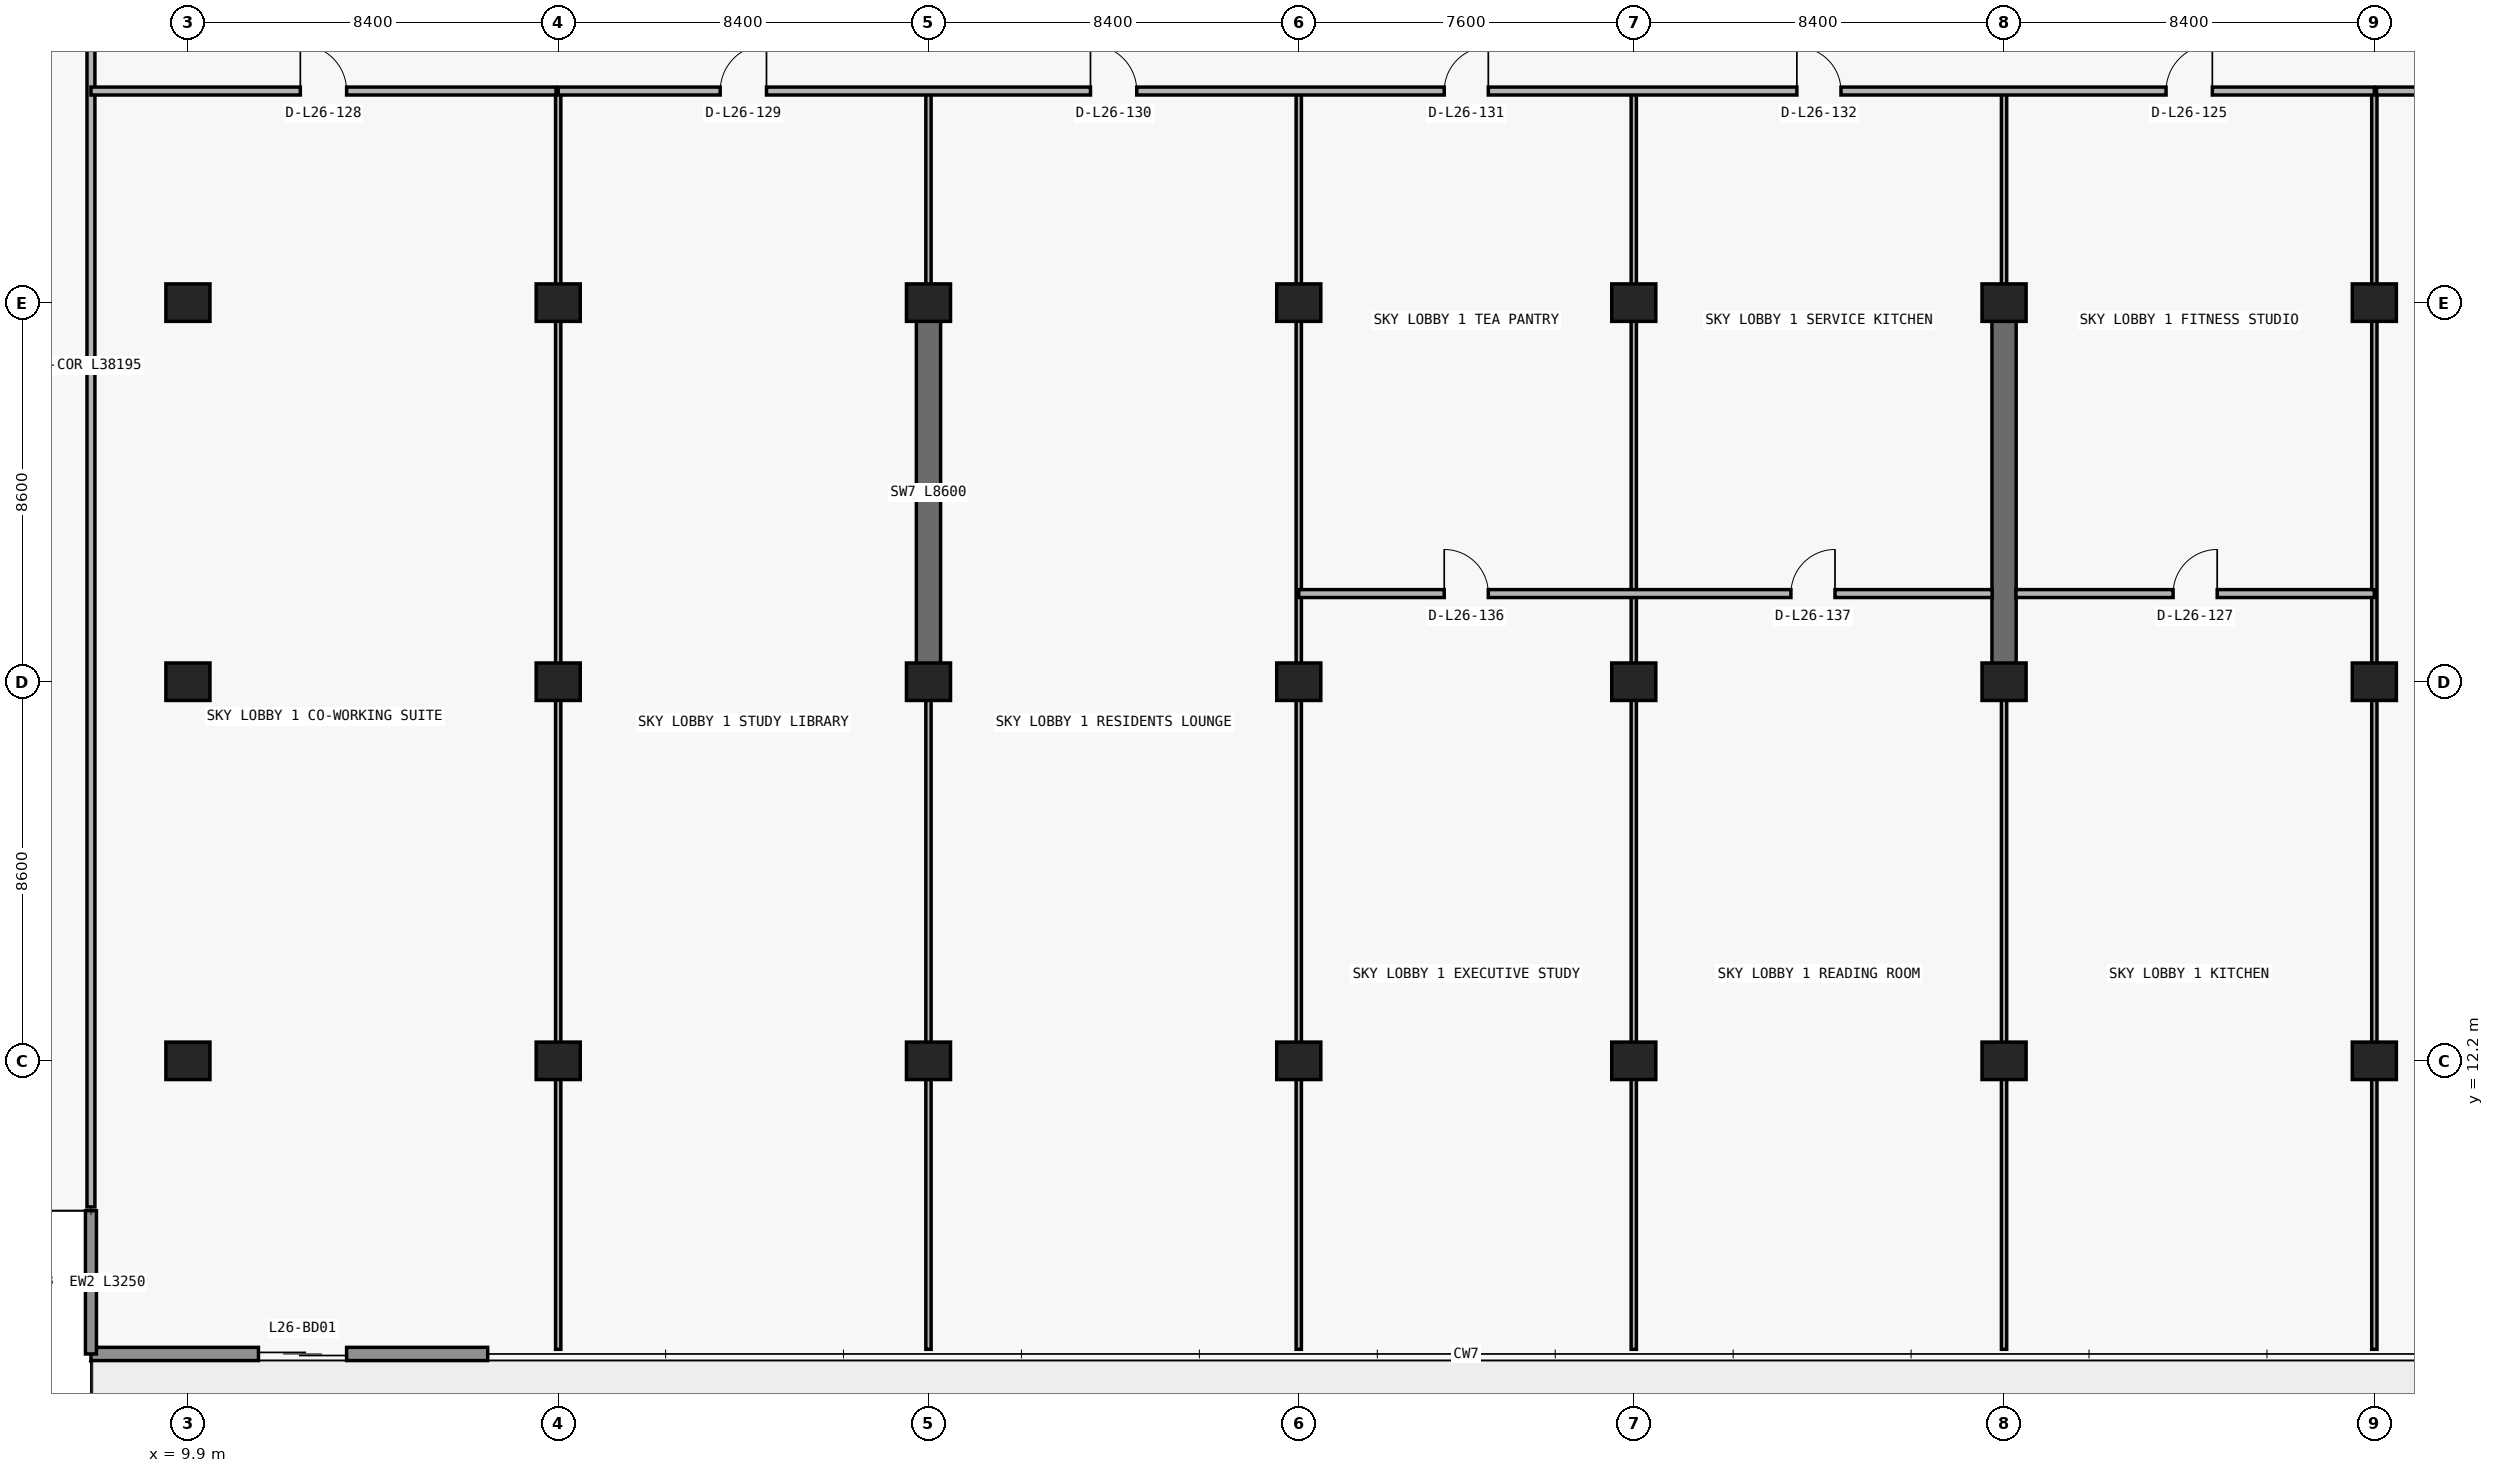
"""IFC4 building model, lengths in metres.
Left out: names, types, materials, properties, quantities, classifications, styles, units other than length and angle.
Written with IfcOpenShell. Run it as: python <this file> out.ifc"""

import sys

from ifc_helpers import new_model, si_unit, direction, frame, frame_2d, origin, origin_2d, place, context, subcontext, project, spatial, rectangle, extrude, element, fill, save


model = new_model("IFC4")
c1 = context("Model", 3, precision=1e-05, world=origin(), true_north=direction((0.0, 1.0)))
c2 = subcontext(c1, "Body", "Model", "MODEL_VIEW")
j1 = project(units=[si_unit("LENGTHUNIT", "METRE"), si_unit("PLANEANGLEUNIT", "RADIAN")], contexts=[c1])
p1 = place(None, origin())
s1 = spatial("IfcSite", under=j1, at=p1, CompositionType="ELEMENT")
p2 = place(p1, origin())
s2 = spatial("IfcBuilding", under=s1, at=p2, CompositionType="ELEMENT")
p3 = place(p2, frame((0.0, 0.0, 97.8)))
s3 = spatial("IfcBuildingStorey", under=s2, at=p3, CompositionType="ELEMENT", Elevation=97.8)
for number, where, z_axis, x_axis in (
    (1, (9.9, 12.2, 0.0), (0.0, 0.0, 1.0), (1.0, 0.0, 0.0)),
    (2, (18.3, 12.2, 0.0), (0.0, 0.0, 1.0), (1.0, 0.0, 0.0)),
    (3, (26.7, 12.2, 0.0), (0.0, 0.0, 1.0), (1.0, 0.0, 0.0)),
    (4, (35.1, 12.2, 0.0), (0.0, 0.0, 1.0), (1.0, 0.0, 0.0)),
    (5, (42.7, 12.2, 0.0), (0.0, 0.0, 1.0), (1.0, 0.0, 0.0)),
    (6, (51.1, 12.2, 0.0), (0.0, 0.0, 1.0), (1.0, 0.0, 0.0)),
    (7, (59.5, 12.2, 0.0), (0.0, 0.0, 1.0), (1.0, 0.0, 0.0)),
    (8, (9.9, 20.8, 0.0), (0.0, 0.0, 1.0), (1.0, 0.0, 0.0)),
    (9, (18.3, 20.8, 0.0), (0.0, 0.0, 1.0), (1.0, 0.0, 0.0)),
    (10, (26.7, 20.8, 0.0), (0.0, 0.0, 1.0), (1.0, 0.0, 0.0)),
    (11, (35.1, 20.8, 0.0), (0.0, 0.0, 1.0), (1.0, 0.0, 0.0)),
    (12, (42.7, 20.8, 0.0), (0.0, 0.0, 1.0), (1.0, 0.0, 0.0)),
    (13, (51.1, 20.8, 0.0), (0.0, 0.0, 1.0), (1.0, 0.0, 0.0)),
    (14, (59.5, 20.8, 0.0), (0.0, 0.0, 1.0), (1.0, 0.0, 0.0)),
    (15, (9.9, 29.4, 0.0), (0.0, 0.0, 1.0), (1.0, 0.0, 0.0)),
    (16, (18.3, 29.4, 0.0), (0.0, 0.0, 1.0), (1.0, 0.0, 0.0)),
    (17, (26.7, 29.4, 0.0), (0.0, 0.0, 1.0), (1.0, 0.0, 0.0)),
    (18, (35.1, 29.4, 0.0), (0.0, 0.0, 1.0), (1.0, 0.0, 0.0)),
    (19, (42.7, 29.4, 0.0), (0.0, 0.0, 1.0), (1.0, 0.0, 0.0)),
    (20, (51.1, 29.4, 0.0), (0.0, 0.0, 1.0), (1.0, 0.0, 0.0)),
    (21, (59.5, 29.4, 0.0), (0.0, 0.0, 1.0), (1.0, 0.0, 0.0)),
):
    element("IfcColumn", number, at=place(p3, frame(where, z_axis=z_axis, x_axis=x_axis)), inside=s3, PredefinedType="COLUMN", context=c2, shape_type="SweptSolid", body=[
        extrude(rectangle(XDim=1.0, YDim=0.85, at=origin_2d()), origin(), (0.0, 0.0, 1.0), 4.55),
    ])
for number, where, z_axis, x_axis in (
    (22, (26.7, 20.8, 0.0), (0.0, 0.0, 1.0), (0.0, 1.0, 0.0)),
    (23, (51.1, 20.8, 0.0), (0.0, 0.0, 1.0), (0.0, 1.0, 0.0)),
):
    element("IfcWall", number, at=place(p3, frame(where, z_axis=z_axis, x_axis=x_axis)), inside=s3, PredefinedType="SHEAR", context=c2, shape_type="SweptSolid", body=[
        extrude(rectangle(XDim=8.6, YDim=0.55, at=frame_2d((4.3, 0.0))), origin(), (0.0, 0.0, 1.0), 4.55),
    ])
p4 = place(p3, frame((16.7, 5.55, 0.0), z_axis=(0.0, 0.0, 1.0), x_axis=(-1.0, 0.0, 0.0)))
e24 = element("IfcWall", 24, at=p4, inside=s3, PredefinedType="STANDARD", context=c2, shape_type="SweptSolid", body=[
    extrude(rectangle(XDim=9.0, YDim=0.3, at=frame_2d((4.5, 0.0))), origin(), (0.0, 0.0, 1.0), 4.55),
])
p5 = place(p4, frame((3.2, 0.0, 0.0)))
e25 = element("IfcOpeningElement", 25, at=p5, cuts=e24, PredefinedType="OPENING", context=c2, shape_type="SweptSolid", body=[
    extrude(rectangle(XDim=2.0, YDim=2.3, at=frame_2d((1.0, 1.15))), frame((0.0, 0.16, 0.0), z_axis=(0.0, -1.0, 0.0), x_axis=(1.0, 0.0, 0.0)), (0.0, 0.0, 1.0), 0.32),
])
p6 = place(p3, frame((7.7, 8.8, 0.0), z_axis=(0.0, 0.0, 1.0), x_axis=(0.0, -1.0, 0.0)))
e26 = element("IfcWall", 26, at=p6, inside=s3, PredefinedType="ELEMENTEDWALL", context=c2, shape_type="SweptSolid", body=[
    extrude(rectangle(XDim=3.25, YDim=0.25, at=frame_2d((1.625, 0.0))), origin(), (0.0, 0.0, 1.0), 4.55),
])
p7 = place(p3, frame((7.7, 8.885, 0.0), z_axis=(0.0, 0.0, 1.0), x_axis=(0.0, 1.0, 0.0)))
e27 = element("IfcWall", 27, at=p7, inside=s3, PredefinedType="PARTITIONING", context=c2, shape_type="SweptSolid", body=[
    extrude(rectangle(XDim=38.195, YDim=0.18, at=frame_2d((19.098, 0.0))), origin(), (0.0, 0.0, 1.0), 4.55),
])
p8 = place(p3, frame((18.3, 5.655, 0.0), z_axis=(0.0, 0.0, 1.0), x_axis=(0.0, 1.0, 0.0)))
e28 = element("IfcWall", 28, at=p8, inside=s3, PredefinedType="PARTITIONING", context=c2, shape_type="SweptSolid", body=[
    extrude(rectangle(XDim=28.545, YDim=0.12, at=frame_2d((14.272, 0.0))), origin(), (0.0, 0.0, 1.0), 3.514),
])
p9 = place(p3, frame((26.7, 5.655, 0.0), z_axis=(0.0, 0.0, 1.0), x_axis=(0.0, 1.0, 0.0)))
e29 = element("IfcWall", 29, at=p9, inside=s3, PredefinedType="PARTITIONING", context=c2, shape_type="SweptSolid", body=[
    extrude(rectangle(XDim=15.14, YDim=0.12, at=frame_2d((7.57, 0.0))), origin(), (0.0, 0.0, 1.0), 3.514),
])
p10 = place(p3, frame((26.7, 29.405, 0.0), z_axis=(0.0, 0.0, 1.0), x_axis=(0.0, 1.0, 0.0)))
e30 = element("IfcWall", 30, at=p10, inside=s3, PredefinedType="PARTITIONING", context=c2, shape_type="SweptSolid", body=[
    extrude(rectangle(XDim=4.795, YDim=0.12, at=frame_2d((2.397, 0.0))), origin(), (0.0, 0.0, 1.0), 3.835),
])
for number, where, z_axis, x_axis in (
    (31, (35.1, 5.655, 0.0), (0.0, 0.0, 1.0), (0.0, 1.0, 0.0)),
    (32, (42.7, 5.655, 0.0), (0.0, 0.0, 1.0), (0.0, 1.0, 0.0)),
):
    element("IfcWall", number, at=place(p3, frame(where, z_axis=z_axis, x_axis=x_axis)), inside=s3, PredefinedType="PARTITIONING", context=c2, shape_type="SweptSolid", body=[
        extrude(rectangle(XDim=28.545, YDim=0.12, at=frame_2d((14.272, 0.0))), origin(), (0.0, 0.0, 1.0), 3.514),
    ])
p11 = place(p3, frame((51.1, 5.655, 0.0), z_axis=(0.0, 0.0, 1.0), x_axis=(0.0, 1.0, 0.0)))
e33 = element("IfcWall", 33, at=p11, inside=s3, PredefinedType="PARTITIONING", context=c2, shape_type="SweptSolid", body=[
    extrude(rectangle(XDim=15.14, YDim=0.12, at=frame_2d((7.57, 0.0))), origin(), (0.0, 0.0, 1.0), 3.514),
])
p12 = place(p3, frame((51.1, 29.405, 0.0), z_axis=(0.0, 0.0, 1.0), x_axis=(0.0, 1.0, 0.0)))
e34 = element("IfcWall", 34, at=p12, inside=s3, PredefinedType="PARTITIONING", context=c2, shape_type="SweptSolid", body=[
    extrude(rectangle(XDim=4.795, YDim=0.12, at=frame_2d((2.397, 0.0))), origin(), (0.0, 0.0, 1.0), 3.835),
])
p13 = place(p3, frame((59.5, 5.655, 0.0), z_axis=(0.0, 0.0, 1.0), x_axis=(0.0, 1.0, 0.0)))
e35 = element("IfcWall", 35, at=p13, inside=s3, PredefinedType="PARTITIONING", context=c2, shape_type="SweptSolid", body=[
    extrude(rectangle(XDim=28.545, YDim=0.12, at=frame_2d((14.272, 0.0))), origin(), (0.0, 0.0, 1.0), 3.514),
])
p14 = place(p3, frame((35.1, 22.8, 0.0), z_axis=(0.0, 0.0, 1.0), x_axis=(1.0, 0.0, 0.0)))
e36 = element("IfcWall", 36, at=p14, inside=s3, PredefinedType="PARTITIONING", context=c2, shape_type="SweptSolid", body=[
    extrude(rectangle(XDim=15.73, YDim=0.18, at=frame_2d((7.865, 0.0))), origin(), (0.0, 0.0, 1.0), 4.55),
])
p15 = place(p14, frame((3.3, 0.0, 0.0)))
e37 = element("IfcOpeningElement", 37, at=p15, cuts=e36, PredefinedType="OPENING", context=c2, shape_type="SweptSolid", body=[
    extrude(rectangle(XDim=1.0, YDim=2.2, at=frame_2d((0.5, 1.1))), frame((0.0, 0.1, 0.0), z_axis=(0.0, -1.0, 0.0), x_axis=(1.0, 0.0, 0.0)), (0.0, 0.0, 1.0), 0.2),
])
p16 = place(p14, frame((11.165, 0.0, 0.0)))
e38 = element("IfcOpeningElement", 38, at=p16, cuts=e36, PredefinedType="OPENING", context=c2, shape_type="SweptSolid", body=[
    extrude(rectangle(XDim=1.0, YDim=2.2, at=frame_2d((0.5, 1.1))), frame((0.0, 0.1, 0.0), z_axis=(0.0, -1.0, 0.0), x_axis=(1.0, 0.0, 0.0)), (0.0, 0.0, 1.0), 0.2),
])
p17 = place(p3, frame((51.37, 22.8, 0.0), z_axis=(0.0, 0.0, 1.0), x_axis=(1.0, 0.0, 0.0)))
e39 = element("IfcWall", 39, at=p17, inside=s3, PredefinedType="PARTITIONING", context=c2, shape_type="SweptSolid", body=[
    extrude(rectangle(XDim=8.13, YDim=0.18, at=frame_2d((4.065, 0.0))), origin(), (0.0, 0.0, 1.0), 4.55),
])
p18 = place(p17, frame((3.565, 0.0, 0.0)))
e40 = element("IfcOpeningElement", 40, at=p18, cuts=e39, PredefinedType="OPENING", context=c2, shape_type="SweptSolid", body=[
    extrude(rectangle(XDim=1.0, YDim=2.2, at=frame_2d((0.5, 1.1))), frame((0.0, 0.1, 0.0), z_axis=(0.0, -1.0, 0.0), x_axis=(1.0, 0.0, 0.0)), (0.0, 0.0, 1.0), 0.2),
])
p19 = place(p3, frame((7.7, 34.2, 0.0), z_axis=(0.0, 0.0, 1.0), x_axis=(1.0, 0.0, 0.0)))
e41 = element("IfcWall", 41, at=p19, inside=s3, PredefinedType="PARTITIONING", context=c2, shape_type="SweptSolid", body=[
    extrude(rectangle(XDim=10.55, YDim=0.18, at=frame_2d((5.275, 0.0))), origin(), (0.0, 0.0, 1.0), 4.55),
])
p20 = place(p19, frame((4.75, 0.0, 0.0)))
e42 = element("IfcOpeningElement", 42, at=p20, cuts=e41, PredefinedType="OPENING", context=c2, shape_type="SweptSolid", body=[
    extrude(rectangle(XDim=1.05, YDim=2.15, at=frame_2d((0.525, 1.075))), frame((0.0, 0.1, 0.0), z_axis=(0.0, -1.0, 0.0), x_axis=(1.0, 0.0, 0.0)), (0.0, 0.0, 1.0), 0.2),
])
p21 = place(p3, frame((18.3, 34.2, 0.0), z_axis=(0.0, 0.0, 1.0), x_axis=(1.0, 0.0, 0.0)))
e43 = element("IfcWall", 43, at=p21, inside=s3, PredefinedType="PARTITIONING", context=c2, shape_type="SweptSolid", body=[
    extrude(rectangle(XDim=41.2, YDim=0.18, at=frame_2d((20.6, 0.0))), origin(), (0.0, 0.0, 1.0), 4.55),
])
p22 = place(p21, frame((36.475, 0.0, 0.0)))
e44 = element("IfcOpeningElement", 44, at=p22, cuts=e43, PredefinedType="OPENING", context=c2, shape_type="SweptSolid", body=[
    extrude(rectangle(XDim=1.05, YDim=2.15, at=frame_2d((0.525, 1.075))), frame((0.0, 0.1, 0.0), z_axis=(0.0, -1.0, 0.0), x_axis=(1.0, 0.0, 0.0)), (0.0, 0.0, 1.0), 0.2),
])
p23 = place(p21, frame((3.675, 0.0, 0.0)))
e45 = element("IfcOpeningElement", 45, at=p23, cuts=e43, PredefinedType="OPENING", context=c2, shape_type="SweptSolid", body=[
    extrude(rectangle(XDim=1.05, YDim=2.15, at=frame_2d((0.525, 1.075))), frame((0.0, 0.1, 0.0), z_axis=(0.0, -1.0, 0.0), x_axis=(1.0, 0.0, 0.0)), (0.0, 0.0, 1.0), 0.2),
])
p24 = place(p21, frame((12.075, 0.0, 0.0)))
e46 = element("IfcOpeningElement", 46, at=p24, cuts=e43, PredefinedType="OPENING", context=c2, shape_type="SweptSolid", body=[
    extrude(rectangle(XDim=1.05, YDim=2.15, at=frame_2d((0.525, 1.075))), frame((0.0, 0.1, 0.0), z_axis=(0.0, -1.0, 0.0), x_axis=(1.0, 0.0, 0.0)), (0.0, 0.0, 1.0), 0.2),
])
p25 = place(p21, frame((20.1, 0.0, 0.0)))
e47 = element("IfcOpeningElement", 47, at=p25, cuts=e43, PredefinedType="OPENING", context=c2, shape_type="SweptSolid", body=[
    extrude(rectangle(XDim=1.0, YDim=2.2, at=frame_2d((0.5, 1.1))), frame((0.0, 0.1, 0.0), z_axis=(0.0, -1.0, 0.0), x_axis=(1.0, 0.0, 0.0)), (0.0, 0.0, 1.0), 0.2),
])
p26 = place(p21, frame((28.1, 0.0, 0.0)))
e48 = element("IfcOpeningElement", 48, at=p26, cuts=e43, PredefinedType="OPENING", context=c2, shape_type="SweptSolid", body=[
    extrude(rectangle(XDim=1.0, YDim=2.2, at=frame_2d((0.5, 1.1))), frame((0.0, 0.1, 0.0), z_axis=(0.0, -1.0, 0.0), x_axis=(1.0, 0.0, 0.0)), (0.0, 0.0, 1.0), 0.2),
])
p27 = place(p3, frame((59.55, 34.2, 0.0), z_axis=(0.0, 0.0, 1.0), x_axis=(1.0, 0.0, 0.0)))
e49 = element("IfcWall", 49, at=p27, inside=s3, PredefinedType="PARTITIONING", context=c2, shape_type="SweptSolid", body=[
    extrude(rectangle(XDim=10.55, YDim=0.18, at=frame_2d((5.275, 0.0))), origin(), (0.0, 0.0, 1.0), 4.55),
])
p28 = place(p27, frame((4.75, 0.0, 0.0)))
e50 = element("IfcOpeningElement", 50, at=p28, cuts=e49, PredefinedType="OPENING", context=c2, shape_type="SweptSolid", body=[
    extrude(rectangle(XDim=1.05, YDim=2.15, at=frame_2d((0.525, 1.075))), frame((0.0, 0.1, 0.0), z_axis=(0.0, -1.0, 0.0), x_axis=(1.0, 0.0, 0.0)), (0.0, 0.0, 1.0), 0.2),
])
p29 = place(p5, origin())
e51 = element("IfcDoor", 51, at=p29, inside=s3, OperationType="DOUBLE_DOOR_SLIDING", PredefinedType="DOOR", context=c2, shape_type="SweptSolid", body=[
    extrude(rectangle(XDim=2.0, YDim=2.3, at=frame_2d((1.0, 1.15))), frame((0.0, 0.025, 0.0), z_axis=(0.0, -1.0, 0.0), x_axis=(1.0, 0.0, 0.0)), (0.0, 0.0, 1.0), 0.05),
])
fill(e25, e51)
p30 = place(p22, origin())
e52 = element("IfcDoor", 52, at=p30, inside=s3, OperationType="SINGLE_SWING_RIGHT", PredefinedType="DOOR", context=c2, shape_type="SweptSolid", body=[
    extrude(rectangle(XDim=1.05, YDim=2.15, at=frame_2d((0.525, 1.075))), frame((0.0, 0.025, 0.0), z_axis=(0.0, -1.0, 0.0), x_axis=(1.0, 0.0, 0.0)), (0.0, 0.0, 1.0), 0.05),
])
fill(e44, e52)
p31 = place(p18, origin())
e53 = element("IfcDoor", 53, at=p31, inside=s3, OperationType="SINGLE_SWING_RIGHT", PredefinedType="DOOR", context=c2, shape_type="SweptSolid", body=[
    extrude(rectangle(XDim=1.0, YDim=2.2, at=frame_2d((0.5, 1.1))), frame((0.0, 0.025, 0.0), z_axis=(0.0, -1.0, 0.0), x_axis=(1.0, 0.0, 0.0)), (0.0, 0.0, 1.0), 0.05),
])
fill(e40, e53)
p32 = place(p20, origin())
e54 = element("IfcDoor", 54, at=p32, inside=s3, OperationType="SINGLE_SWING_LEFT", PredefinedType="DOOR", context=c2, shape_type="SweptSolid", body=[
    extrude(rectangle(XDim=1.05, YDim=2.15, at=frame_2d((0.525, 1.075))), frame((0.0, 0.025, 0.0), z_axis=(0.0, -1.0, 0.0), x_axis=(1.0, 0.0, 0.0)), (0.0, 0.0, 1.0), 0.05),
])
fill(e42, e54)
p33 = place(p23, origin())
e55 = element("IfcDoor", 55, at=p33, inside=s3, OperationType="SINGLE_SWING_RIGHT", PredefinedType="DOOR", context=c2, shape_type="SweptSolid", body=[
    extrude(rectangle(XDim=1.05, YDim=2.15, at=frame_2d((0.525, 1.075))), frame((0.0, 0.025, 0.0), z_axis=(0.0, -1.0, 0.0), x_axis=(1.0, 0.0, 0.0)), (0.0, 0.0, 1.0), 0.05),
])
fill(e45, e55)
p34 = place(p24, origin())
e56 = element("IfcDoor", 56, at=p34, inside=s3, OperationType="SINGLE_SWING_LEFT", PredefinedType="DOOR", context=c2, shape_type="SweptSolid", body=[
    extrude(rectangle(XDim=1.05, YDim=2.15, at=frame_2d((0.525, 1.075))), frame((0.0, 0.025, 0.0), z_axis=(0.0, -1.0, 0.0), x_axis=(1.0, 0.0, 0.0)), (0.0, 0.0, 1.0), 0.05),
])
fill(e46, e56)
p35 = place(p25, origin())
e57 = element("IfcDoor", 57, at=p35, inside=s3, OperationType="SINGLE_SWING_RIGHT", PredefinedType="DOOR", context=c2, shape_type="SweptSolid", body=[
    extrude(rectangle(XDim=1.0, YDim=2.2, at=frame_2d((0.5, 1.1))), frame((0.0, 0.025, 0.0), z_axis=(0.0, -1.0, 0.0), x_axis=(1.0, 0.0, 0.0)), (0.0, 0.0, 1.0), 0.05),
])
fill(e47, e57)
p36 = place(p26, origin())
e58 = element("IfcDoor", 58, at=p36, inside=s3, OperationType="SINGLE_SWING_LEFT", PredefinedType="DOOR", context=c2, shape_type="SweptSolid", body=[
    extrude(rectangle(XDim=1.0, YDim=2.2, at=frame_2d((0.5, 1.1))), frame((0.0, 0.025, 0.0), z_axis=(0.0, -1.0, 0.0), x_axis=(1.0, 0.0, 0.0)), (0.0, 0.0, 1.0), 0.05),
])
fill(e48, e58)
p37 = place(p15, origin())
e59 = element("IfcDoor", 59, at=p37, inside=s3, OperationType="SINGLE_SWING_LEFT", PredefinedType="DOOR", context=c2, shape_type="SweptSolid", body=[
    extrude(rectangle(XDim=1.0, YDim=2.2, at=frame_2d((0.5, 1.1))), frame((0.0, 0.025, 0.0), z_axis=(0.0, -1.0, 0.0), x_axis=(1.0, 0.0, 0.0)), (0.0, 0.0, 1.0), 0.05),
])
fill(e37, e59)
p38 = place(p16, origin())
e60 = element("IfcDoor", 60, at=p38, inside=s3, OperationType="SINGLE_SWING_RIGHT", PredefinedType="DOOR", context=c2, shape_type="SweptSolid", body=[
    extrude(rectangle(XDim=1.0, YDim=2.2, at=frame_2d((0.5, 1.1))), frame((0.0, 0.025, 0.0), z_axis=(0.0, -1.0, 0.0), x_axis=(1.0, 0.0, 0.0)), (0.0, 0.0, 1.0), 0.05),
])
fill(e38, e60)
save(model, sys.argv[1])
